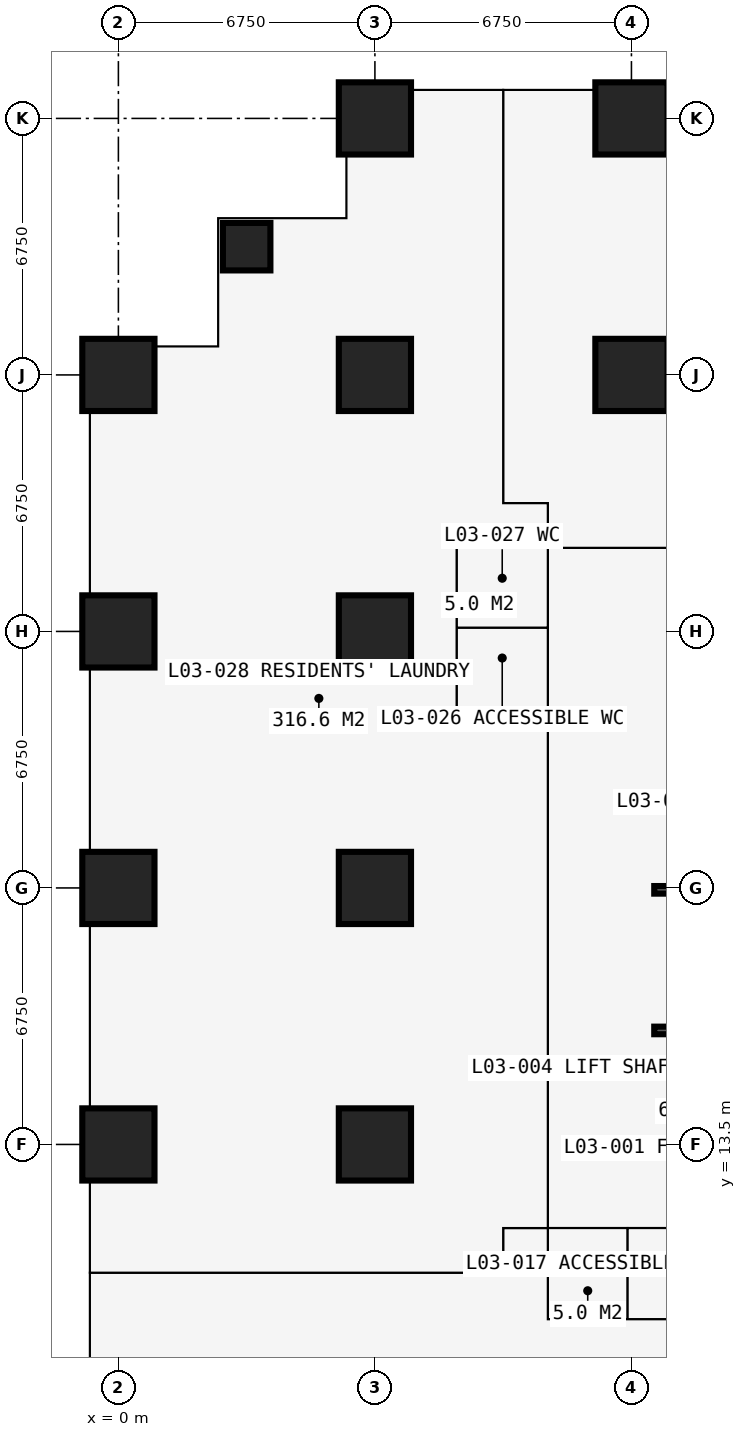
"""IFC4 building model, lengths in metres.
Left out: names, types, materials, properties, quantities, classifications, styles, units other than length and angle.
Written with IfcOpenShell. Run it as: python <this file> out.ifc"""

import sys

from ifc_helpers import new_model, si_unit, direction, frame, frame_2d, origin, origin_2d, place, context, subcontext, project, spatial, rectangle, extrude, element, fill, save


model = new_model("IFC4")
c1 = context("Model", 3, precision=1e-05, world=origin(), true_north=direction((0.0, 1.0)))
c2 = subcontext(c1, "Body", "Model", "MODEL_VIEW")
j1 = project(units=[si_unit("LENGTHUNIT", "METRE"), si_unit("PLANEANGLEUNIT", "RADIAN")], contexts=[c1])
p1 = place(None, origin())
s1 = spatial("IfcSite", under=j1, at=p1, CompositionType="ELEMENT")
p2 = place(p1, origin())
s2 = spatial("IfcBuilding", under=s1, at=p2, CompositionType="ELEMENT")
p3 = place(p2, frame((0.0, 0.0, 13.5)))
s3 = spatial("IfcBuildingStorey", under=s2, at=p3, CompositionType="ELEMENT", Elevation=13.5)
for number, where, z_axis, x_axis in (
    (1, (0.0, 13.5, 0.0), (0.0, 0.0, 1.0), (1.0, 0.0, 0.0)),
    (2, (0.0, 20.25, 0.0), (0.0, 0.0, 1.0), (1.0, 0.0, 0.0)),
    (3, (0.0, 27.0, 0.0), (0.0, 0.0, 1.0), (1.0, 0.0, 0.0)),
    (4, (0.0, 33.75, 0.0), (0.0, 0.0, 1.0), (1.0, 0.0, 0.0)),
):
    element("IfcColumn", number, at=place(p3, frame(where, z_axis=z_axis, x_axis=x_axis)), inside=s3, PredefinedType="COLUMN", context=c2, shape_type="SweptSolid", body=[
        extrude(rectangle(XDim=1.9, YDim=1.9, at=origin_2d()), origin(), (0.0, 0.0, 1.0), 4.5),
    ])
p4 = place(p3, frame((3.375, 37.125, 0.0), z_axis=(0.0, 0.0, 1.0), x_axis=(1.0, 0.0, 0.0)))
e5 = element("IfcColumn", 5, at=p4, inside=s3, PredefinedType="COLUMN", context=c2, shape_type="SweptSolid", body=[
    extrude(rectangle(XDim=1.25, YDim=1.25, at=origin_2d()), origin(), (0.0, 0.0, 1.0), 4.5),
])
for number, where, z_axis, x_axis in (
    (6, (6.75, 13.5, 0.0), (0.0, 0.0, 1.0), (1.0, 0.0, 0.0)),
    (7, (6.75, 20.25, 0.0), (0.0, 0.0, 1.0), (1.0, 0.0, 0.0)),
    (8, (6.75, 27.0, 0.0), (0.0, 0.0, 1.0), (1.0, 0.0, 0.0)),
    (9, (6.75, 33.75, 0.0), (0.0, 0.0, 1.0), (1.0, 0.0, 0.0)),
    (10, (6.75, 40.5, 0.0), (0.0, 0.0, 1.0), (1.0, 0.0, 0.0)),
    (11, (13.5, 33.75, 0.0), (0.0, 0.0, 1.0), (1.0, 0.0, 0.0)),
    (12, (13.5, 40.5, 0.0), (0.0, 0.0, 1.0), (1.0, 0.0, 0.0)),
):
    element("IfcColumn", number, at=place(p3, frame(where, z_axis=z_axis, x_axis=x_axis)), inside=s3, PredefinedType="COLUMN", context=c2, shape_type="SweptSolid", body=[
        extrude(rectangle(XDim=1.9, YDim=1.9, at=origin_2d()), origin(), (0.0, 0.0, 1.0), 4.5),
    ])
p5 = place(p3, frame((12.9, 13.5, 0.0), z_axis=(0.0, 0.0, 1.0), x_axis=(1.0, 0.0, 0.0)))
e13 = element("IfcWall", 13, at=p5, inside=s3, PredefinedType="SHEAR", context=c2, shape_type="SweptSolid", body=[
    extrude(rectangle(XDim=14.7, YDim=1.2, at=frame_2d((7.35, 0.0))), origin(), (0.0, 0.0, 1.0), 4.5),
])
p6 = place(p3, frame((27.6, 27.0, 0.0), z_axis=(0.0, 0.0, 1.0), x_axis=(-1.0, 0.0, 0.0)))
e14 = element("IfcWall", 14, at=p6, inside=s3, PredefinedType="SHEAR", context=c2, shape_type="SweptSolid", body=[
    extrude(rectangle(XDim=14.7, YDim=1.2, at=frame_2d((7.35, 0.0))), origin(), (0.0, 0.0, 1.0), 4.5),
])
p7 = place(p6, frame((4.55, 0.0, 0.0)))
e15 = element("IfcOpeningElement", 15, at=p7, cuts=e14, PredefinedType="OPENING", context=c2, shape_type="SweptSolid", body=[
    extrude(rectangle(XDim=0.9, YDim=2.2, at=frame_2d((0.45, 1.1))), frame((0.0, 0.61, 0.0), z_axis=(0.0, -1.0, 0.0), x_axis=(1.0, 0.0, 0.0)), (0.0, 0.0, 1.0), 1.22),
])
p8 = place(p6, frame((7.525, 0.0, 0.0)))
e16 = element("IfcOpeningElement", 16, at=p8, cuts=e14, PredefinedType="OPENING", context=c2, shape_type="SweptSolid", body=[
    extrude(rectangle(XDim=1.0, YDim=2.2, at=frame_2d((0.5, 1.1))), frame((0.0, 0.61, 0.0), z_axis=(0.0, -1.0, 0.0), x_axis=(1.0, 0.0, 0.0)), (0.0, 0.0, 1.0), 1.22),
])
p9 = place(p3, frame((13.5, 26.4, 0.0), z_axis=(0.0, 0.0, 1.0), x_axis=(0.0, -1.0, 0.0)))
e17 = element("IfcWall", 17, at=p9, inside=s3, PredefinedType="SHEAR", context=c2, shape_type="SweptSolid", body=[
    extrude(rectangle(XDim=12.3, YDim=1.2, at=frame_2d((6.15, 0.0))), origin(), (0.0, 0.0, 1.0), 4.5),
])
p10 = place(p9, frame((7.45, 0.0, 0.0)))
e18 = element("IfcOpeningElement", 18, at=p10, cuts=e17, PredefinedType="OPENING", context=c2, shape_type="SweptSolid", body=[
    extrude(rectangle(XDim=1.2, YDim=2.2, at=frame_2d((0.6, 1.1))), frame((0.0, 0.61, 0.0), z_axis=(0.0, -1.0, 0.0), x_axis=(1.0, 0.0, 0.0)), (0.0, 0.0, 1.0), 1.22),
])
p11 = place(p3, frame((6.0, 41.25, 0.0), z_axis=(0.0, 0.0, 1.0), x_axis=(0.0, -1.0, 0.0)))
e19 = element("IfcWall", 19, at=p11, inside=s3, PredefinedType="SOLIDWALL", context=c2, shape_type="SweptSolid", body=[
    extrude(rectangle(XDim=3.375, YDim=0.3, at=frame_2d((1.688, 0.0))), origin(), (0.0, 0.0, 1.0), 4.275),
])
p12 = place(p11, frame((1.857, 0.0, 0.9)))
e20 = element("IfcOpeningElement", 20, at=p12, cuts=e19, PredefinedType="OPENING", context=c2, shape_type="SweptSolid", body=[
    extrude(rectangle(XDim=1.2, YDim=1.8, at=frame_2d((0.6, 0.9))), frame((0.0, 0.16, 0.0), z_axis=(0.0, -1.0, 0.0), x_axis=(1.0, 0.0, 0.0)), (0.0, 0.0, 1.0), 0.32),
])
p13 = place(p3, frame((6.0, 37.875, 0.0), z_axis=(0.0, 0.0, 1.0), x_axis=(-1.0, 0.0, 0.0)))
e21 = element("IfcWall", 21, at=p13, inside=s3, PredefinedType="SOLIDWALL", context=c2, shape_type="SweptSolid", body=[
    extrude(rectangle(XDim=3.375, YDim=0.3, at=frame_2d((1.688, 0.0))), origin(), (0.0, 0.0, 1.0), 4.275),
])
p14 = place(p13, frame((0.938, 0.0, 0.9)))
e22 = element("IfcOpeningElement", 22, at=p14, cuts=e21, PredefinedType="OPENING", context=c2, shape_type="SweptSolid", body=[
    extrude(rectangle(XDim=1.5, YDim=1.8, at=frame_2d((0.75, 0.9))), frame((0.0, 0.16, 0.0), z_axis=(0.0, -1.0, 0.0), x_axis=(1.0, 0.0, 0.0)), (0.0, 0.0, 1.0), 0.32),
])
p15 = place(p3, frame((2.625, 37.875, 0.0), z_axis=(0.0, 0.0, 1.0), x_axis=(0.0, -1.0, 0.0)))
e23 = element("IfcWall", 23, at=p15, inside=s3, PredefinedType="SOLIDWALL", context=c2, shape_type="SweptSolid", body=[
    extrude(rectangle(XDim=3.375, YDim=0.3, at=frame_2d((1.688, 0.0))), origin(), (0.0, 0.0, 1.0), 4.275),
])
p16 = place(p15, frame((0.938, 0.0, 0.9)))
e24 = element("IfcOpeningElement", 24, at=p16, cuts=e23, PredefinedType="OPENING", context=c2, shape_type="SweptSolid", body=[
    extrude(rectangle(XDim=1.5, YDim=1.8, at=frame_2d((0.75, 0.9))), frame((0.0, 0.16, 0.0), z_axis=(0.0, -1.0, 0.0), x_axis=(1.0, 0.0, 0.0)), (0.0, 0.0, 1.0), 0.32),
])
p17 = place(p3, frame((2.625, 34.5, 0.0), z_axis=(0.0, 0.0, 1.0), x_axis=(-1.0, 0.0, 0.0)))
e25 = element("IfcWall", 25, at=p17, inside=s3, PredefinedType="SOLIDWALL", context=c2, shape_type="SweptSolid", body=[
    extrude(rectangle(XDim=3.375, YDim=0.3, at=frame_2d((1.688, 0.0))), origin(), (0.0, 0.0, 1.0), 4.275),
])
p18 = place(p17, frame((0.317, 0.0, 0.9)))
e26 = element("IfcOpeningElement", 26, at=p18, cuts=e25, PredefinedType="OPENING", context=c2, shape_type="SweptSolid", body=[
    extrude(rectangle(XDim=1.2, YDim=1.8, at=frame_2d((0.6, 0.9))), frame((0.0, 0.16, 0.0), z_axis=(0.0, -1.0, 0.0), x_axis=(1.0, 0.0, 0.0)), (0.0, 0.0, 1.0), 0.32),
])
p19 = place(p3, frame((-0.75, 20.25, 0.0), z_axis=(0.0, 0.0, 1.0), x_axis=(0.0, 1.0, 0.0)))
e27 = element("IfcWall", 27, at=p19, inside=s3, PredefinedType="SOLIDWALL", context=c2, shape_type="SweptSolid", body=[
    extrude(rectangle(XDim=6.75, YDim=0.15, at=frame_2d((3.375, 0.0))), origin(), (0.0, 0.0, 1.0), 4.275),
])
p20 = place(p19, frame((0.962, 0.0, 0.0)))
e28 = element("IfcOpeningElement", 28, at=p20, cuts=e27, PredefinedType="OPENING", context=c2, shape_type="SweptSolid", body=[
    extrude(rectangle(XDim=2.4, YDim=2.4, at=frame_2d((1.2, 1.2))), frame((0.0, 0.085, 0.0), z_axis=(0.0, -1.0, 0.0), x_axis=(1.0, 0.0, 0.0)), (0.0, 0.0, 1.0), 0.17),
])
p21 = place(p19, frame((3.387, 0.0, 0.0)))
e29 = element("IfcOpeningElement", 29, at=p21, cuts=e27, PredefinedType="OPENING", context=c2, shape_type="SweptSolid", body=[
    extrude(rectangle(XDim=2.4, YDim=2.4, at=frame_2d((1.2, 1.2))), frame((0.0, 0.085, 0.0), z_axis=(0.0, -1.0, 0.0), x_axis=(1.0, 0.0, 0.0)), (0.0, 0.0, 1.0), 0.17),
])
p22 = place(p3, frame((14.1, 16.5, 0.0), z_axis=(0.0, 0.0, 1.0), x_axis=(1.0, 0.0, 0.0)))
e30 = element("IfcWall", 30, at=p22, inside=s3, PredefinedType="SHEAR", context=c2, shape_type="SweptSolid", body=[
    extrude(rectangle(XDim=12.3, YDim=0.2, at=frame_2d((6.15, 0.0))), origin(), (0.0, 0.0, 1.0), 4.5),
])
p23 = place(p22, frame((0.9, 0.0, 0.0)))
e31 = element("IfcOpeningElement", 31, at=p23, cuts=e30, PredefinedType="OPENING", context=c2, shape_type="SweptSolid", body=[
    extrude(rectangle(XDim=1.1, YDim=2.2, at=frame_2d((0.55, 1.1))), frame((0.0, 0.11, 0.0), z_axis=(0.0, -1.0, 0.0), x_axis=(1.0, 0.0, 0.0)), (0.0, 0.0, 1.0), 0.22),
])
p24 = place(p22, frame((9.5, 0.0, 0.0)))
e32 = element("IfcOpeningElement", 32, at=p24, cuts=e30, PredefinedType="OPENING", context=c2, shape_type="SweptSolid", body=[
    extrude(rectangle(XDim=1.1, YDim=2.2, at=frame_2d((0.55, 1.1))), frame((0.0, 0.11, 0.0), z_axis=(0.0, -1.0, 0.0), x_axis=(1.0, 0.0, 0.0)), (0.0, 0.0, 1.0), 0.22),
])
p25 = place(p3, frame((14.1, 20.2, 0.0), z_axis=(0.0, 0.0, 1.0), x_axis=(1.0, 0.0, 0.0)))
e33 = element("IfcWall", 33, at=p25, inside=s3, PredefinedType="SHEAR", context=c2, shape_type="SweptSolid", body=[
    extrude(rectangle(XDim=12.3, YDim=0.2, at=frame_2d((6.15, 0.0))), origin(), (0.0, 0.0, 1.0), 4.5),
])
p26 = place(p25, frame((0.35, 0.0, 0.0)))
e34 = element("IfcOpeningElement", 34, at=p26, cuts=e33, PredefinedType="OPENING", context=c2, shape_type="SweptSolid", body=[
    extrude(rectangle(XDim=1.1, YDim=2.2, at=frame_2d((0.55, 1.1))), frame((0.0, 0.11, 0.0), z_axis=(0.0, -1.0, 0.0), x_axis=(1.0, 0.0, 0.0)), (0.0, 0.0, 1.0), 0.22),
])
p27 = place(p25, frame((9.75, 0.0, 0.0)))
e35 = element("IfcOpeningElement", 35, at=p27, cuts=e33, PredefinedType="OPENING", context=c2, shape_type="SweptSolid", body=[
    extrude(rectangle(XDim=1.1, YDim=2.2, at=frame_2d((0.55, 1.1))), frame((0.0, 0.11, 0.0), z_axis=(0.0, -1.0, 0.0), x_axis=(1.0, 0.0, 0.0)), (0.0, 0.0, 1.0), 0.22),
])
p28 = place(p3, frame((-0.734, 10.125, 0.0), z_axis=(0.0, 0.0, 1.0), x_axis=(1.0, 0.0, 0.0)))
e36 = element("IfcWall", 36, at=p28, inside=s3, PredefinedType="PARTITIONING", context=c2, shape_type="SweptSolid", body=[
    extrude(rectangle(XDim=10.859, YDim=0.15, at=frame_2d((5.429, 0.0))), origin(), (0.0, 0.0, 1.0), 4.275),
])
p29 = place(p3, frame((8.9, 25.0, 0.0), z_axis=(0.0, 0.0, 1.0), x_axis=(0.0, 1.0, 0.0)))
e37 = element("IfcWall", 37, at=p29, inside=s3, PredefinedType="PARTITIONING", context=c2, shape_type="SweptSolid", body=[
    extrude(rectangle(XDim=4.2, YDim=0.15, at=frame_2d((2.1, 0.0))), origin(), (0.0, 0.0, 1.0), 4.275),
])
p30 = place(p3, frame((8.9, 25.0, 0.0), z_axis=(0.0, 0.0, 1.0), x_axis=(1.0, 0.0, 0.0)))
e38 = element("IfcWall", 38, at=p30, inside=s3, PredefinedType="PARTITIONING", context=c2, shape_type="SweptSolid", body=[
    extrude(rectangle(XDim=2.4, YDim=0.1, at=frame_2d((1.2, 0.0))), origin(), (0.0, 0.0, 1.0), 4.275),
])
p31 = place(p3, frame((8.9, 27.1, 0.0), z_axis=(0.0, 0.0, 1.0), x_axis=(1.0, 0.0, 0.0)))
e39 = element("IfcWall", 39, at=p31, inside=s3, PredefinedType="PARTITIONING", context=c2, shape_type="SweptSolid", body=[
    extrude(rectangle(XDim=2.4, YDim=0.1, at=frame_2d((1.2, 0.0))), origin(), (0.0, 0.0, 1.0), 3.777),
])
p32 = place(p3, frame((8.9, 29.2, 0.0), z_axis=(0.0, 0.0, 1.0), x_axis=(1.0, 0.0, 0.0)))
e40 = element("IfcWall", 40, at=p32, inside=s3, PredefinedType="PARTITIONING", context=c2, shape_type="SweptSolid", body=[
    extrude(rectangle(XDim=21.475, YDim=0.15, at=frame_2d((10.738, 0.0))), origin(), (0.0, 0.0, 1.0), 4.275),
])
p33 = place(p32, frame((16.65, 0.0, 0.0)))
e41 = element("IfcOpeningElement", 41, at=p33, cuts=e40, PredefinedType="OPENING", context=c2, shape_type="SweptSolid", body=[
    extrude(rectangle(XDim=1.0, YDim=2.2, at=frame_2d((0.5, 1.1))), frame((0.0, 0.085, 0.0), z_axis=(0.0, -1.0, 0.0), x_axis=(1.0, 0.0, 0.0)), (0.0, 0.0, 1.0), 0.17),
])
p34 = place(p32, frame((18.75, 0.0, 0.0)))
e42 = element("IfcOpeningElement", 42, at=p34, cuts=e40, PredefinedType="OPENING", context=c2, shape_type="SweptSolid", body=[
    extrude(rectangle(XDim=1.0, YDim=2.2, at=frame_2d((0.5, 1.1))), frame((0.0, 0.085, 0.0), z_axis=(0.0, -1.0, 0.0), x_axis=(1.0, 0.0, 0.0)), (0.0, 0.0, 1.0), 0.17),
])
p35 = place(p32, frame((8.45, 0.0, 0.0)))
e43 = element("IfcOpeningElement", 43, at=p35, cuts=e40, PredefinedType="OPENING", context=c2, shape_type="SweptSolid", body=[
    extrude(rectangle(XDim=1.6, YDim=2.4, at=frame_2d((0.8, 1.2))), frame((0.0, 0.085, 0.0), z_axis=(0.0, -1.0, 0.0), x_axis=(1.0, 0.0, 0.0)), (0.0, 0.0, 1.0), 0.17),
])
p36 = place(p3, frame((10.125, 10.125, 0.0), z_axis=(0.0, 0.0, 1.0), x_axis=(0.0, 1.0, 0.0)))
e44 = element("IfcWall", 44, at=p36, inside=s3, PredefinedType="PARTITIONING", context=c2, shape_type="SweptSolid", body=[
    extrude(rectangle(XDim=1.175, YDim=0.15, at=frame_2d((0.587, 0.0))), origin(), (0.0, 0.0, 1.0), 4.275),
])
p37 = place(p3, frame((10.125, 11.3, 0.0), z_axis=(0.0, 0.0, 1.0), x_axis=(1.0, 0.0, 0.0)))
e45 = element("IfcWall", 45, at=p37, inside=s3, PredefinedType="PARTITIONING", context=c2, shape_type="SweptSolid", body=[
    extrude(rectangle(XDim=20.675, YDim=0.15, at=frame_2d((10.337, 0.0))), origin(), (0.0, 0.0, 1.0), 4.275),
])
p38 = place(p37, frame((1.725, 0.0, 0.0)))
e46 = element("IfcOpeningElement", 46, at=p38, cuts=e45, PredefinedType="OPENING", context=c2, shape_type="SweptSolid", body=[
    extrude(rectangle(XDim=1.0, YDim=2.2, at=frame_2d((0.5, 1.1))), frame((0.0, 0.085, 0.0), z_axis=(0.0, -1.0, 0.0), x_axis=(1.0, 0.0, 0.0)), (0.0, 0.0, 1.0), 0.17),
])
p39 = place(p37, frame((3.825, 0.0, 0.0)))
e47 = element("IfcOpeningElement", 47, at=p39, cuts=e45, PredefinedType="OPENING", context=c2, shape_type="SweptSolid", body=[
    extrude(rectangle(XDim=1.0, YDim=2.2, at=frame_2d((0.5, 1.1))), frame((0.0, 0.085, 0.0), z_axis=(0.0, -1.0, 0.0), x_axis=(1.0, 0.0, 0.0)), (0.0, 0.0, 1.0), 0.17),
])
p40 = place(p37, frame((10.625, 0.0, 0.0)))
e48 = element("IfcOpeningElement", 48, at=p40, cuts=e45, PredefinedType="OPENING", context=c2, shape_type="SweptSolid", body=[
    extrude(rectangle(XDim=1.6, YDim=2.4, at=frame_2d((0.8, 1.2))), frame((0.0, 0.085, 0.0), z_axis=(0.0, -1.0, 0.0), x_axis=(1.0, 0.0, 0.0)), (0.0, 0.0, 1.0), 0.17),
])
p41 = place(p3, frame((10.125, 30.375, 0.0), z_axis=(0.0, 0.0, 1.0), x_axis=(0.0, 1.0, 0.0)))
e49 = element("IfcWall", 49, at=p41, inside=s3, PredefinedType="PARTITIONING", context=c2, shape_type="SweptSolid", body=[
    extrude(rectangle(XDim=10.859, YDim=0.15, at=frame_2d((5.429, 0.0))), origin(), (0.0, 0.0, 1.0), 4.275),
])
p42 = place(p3, frame((10.125, 30.375, 0.0), z_axis=(0.0, 0.0, 1.0), x_axis=(1.0, 0.0, 0.0)))
e50 = element("IfcWall", 50, at=p42, inside=s3, PredefinedType="PARTITIONING", context=c2, shape_type="SweptSolid", body=[
    extrude(rectangle(XDim=1.175, YDim=0.15, at=frame_2d((0.587, 0.0))), origin(), (0.0, 0.0, 1.0), 4.275),
])
p43 = place(p3, frame((11.3, 8.9, 0.0), z_axis=(0.0, 0.0, 1.0), x_axis=(0.0, 1.0, 0.0)))
e51 = element("IfcWall", 51, at=p43, inside=s3, PredefinedType="PARTITIONING", context=c2, shape_type="SweptSolid", body=[
    extrude(rectangle(XDim=21.475, YDim=0.15, at=frame_2d((10.738, 0.0))), origin(), (0.0, 0.0, 1.0), 4.275),
])
p44 = place(p43, frame((16.65, 0.0, 0.0)))
e52 = element("IfcOpeningElement", 52, at=p44, cuts=e51, PredefinedType="OPENING", context=c2, shape_type="SweptSolid", body=[
    extrude(rectangle(XDim=1.0, YDim=2.2, at=frame_2d((0.5, 1.1))), frame((0.0, 0.085, 0.0), z_axis=(0.0, -1.0, 0.0), x_axis=(1.0, 0.0, 0.0)), (0.0, 0.0, 1.0), 0.17),
])
p45 = place(p43, frame((18.75, 0.0, 0.0)))
e53 = element("IfcOpeningElement", 53, at=p45, cuts=e51, PredefinedType="OPENING", context=c2, shape_type="SweptSolid", body=[
    extrude(rectangle(XDim=1.0, YDim=2.2, at=frame_2d((0.5, 1.1))), frame((0.0, 0.085, 0.0), z_axis=(0.0, -1.0, 0.0), x_axis=(1.0, 0.0, 0.0)), (0.0, 0.0, 1.0), 0.17),
])
p46 = place(p43, frame((8.45, 0.0, 0.0)))
e54 = element("IfcOpeningElement", 54, at=p46, cuts=e51, PredefinedType="OPENING", context=c2, shape_type="SweptSolid", body=[
    extrude(rectangle(XDim=1.6, YDim=2.4, at=frame_2d((0.8, 1.2))), frame((0.0, 0.085, 0.0), z_axis=(0.0, -1.0, 0.0), x_axis=(1.0, 0.0, 0.0)), (0.0, 0.0, 1.0), 0.17),
])
p47 = place(p3, frame((11.3, 8.9, 0.0), z_axis=(0.0, 0.0, 1.0), x_axis=(1.0, 0.0, 0.0)))
e55 = element("IfcWall", 55, at=p47, inside=s3, PredefinedType="PARTITIONING", context=c2, shape_type="SweptSolid", body=[
    extrude(rectangle(XDim=4.2, YDim=0.15, at=frame_2d((2.1, 0.0))), origin(), (0.0, 0.0, 1.0), 4.275),
])
p48 = place(p3, frame((13.4, 8.9, 0.0), z_axis=(0.0, 0.0, 1.0), x_axis=(0.0, 1.0, 0.0)))
e56 = element("IfcWall", 56, at=p48, inside=s3, PredefinedType="PARTITIONING", context=c2, shape_type="SweptSolid", body=[
    extrude(rectangle(XDim=2.4, YDim=0.1, at=frame_2d((1.2, 0.0))), origin(), (0.0, 0.0, 1.0), 3.777),
])
p49 = place(p12, origin())
e57 = element("IfcWindow", 57, at=p49, inside=s3, PartitioningType="SINGLE_PANEL", PredefinedType="WINDOW", context=c2, shape_type="SweptSolid", body=[
    extrude(rectangle(XDim=1.2, YDim=1.8, at=frame_2d((0.6, 0.9))), frame((0.0, 0.03, 0.0), z_axis=(0.0, -1.0, 0.0), x_axis=(1.0, 0.0, 0.0)), (0.0, 0.0, 1.0), 0.06),
])
fill(e20, e57)
p50 = place(p14, origin())
e58 = element("IfcWindow", 58, at=p50, inside=s3, PartitioningType="SINGLE_PANEL", PredefinedType="WINDOW", context=c2, shape_type="SweptSolid", body=[
    extrude(rectangle(XDim=1.5, YDim=1.8, at=frame_2d((0.75, 0.9))), frame((0.0, 0.03, 0.0), z_axis=(0.0, -1.0, 0.0), x_axis=(1.0, 0.0, 0.0)), (0.0, 0.0, 1.0), 0.06),
])
fill(e22, e58)
p51 = place(p16, origin())
e59 = element("IfcWindow", 59, at=p51, inside=s3, PartitioningType="SINGLE_PANEL", PredefinedType="WINDOW", context=c2, shape_type="SweptSolid", body=[
    extrude(rectangle(XDim=1.5, YDim=1.8, at=frame_2d((0.75, 0.9))), frame((0.0, 0.03, 0.0), z_axis=(0.0, -1.0, 0.0), x_axis=(1.0, 0.0, 0.0)), (0.0, 0.0, 1.0), 0.06),
])
fill(e24, e59)
p52 = place(p18, origin())
e60 = element("IfcWindow", 60, at=p52, inside=s3, PartitioningType="SINGLE_PANEL", PredefinedType="WINDOW", context=c2, shape_type="SweptSolid", body=[
    extrude(rectangle(XDim=1.2, YDim=1.8, at=frame_2d((0.6, 0.9))), frame((0.0, 0.03, 0.0), z_axis=(0.0, -1.0, 0.0), x_axis=(1.0, 0.0, 0.0)), (0.0, 0.0, 1.0), 0.06),
])
fill(e26, e60)
p53 = place(p20, origin())
e61 = element("IfcDoor", 61, at=p53, inside=s3, OperationType="SLIDING_TO_LEFT", PredefinedType="DOOR", context=c2, shape_type="SweptSolid", body=[
    extrude(rectangle(XDim=2.4, YDim=2.4, at=frame_2d((1.2, 1.2))), frame((0.0, 0.025, 0.0), z_axis=(0.0, -1.0, 0.0), x_axis=(1.0, 0.0, 0.0)), (0.0, 0.0, 1.0), 0.05),
])
fill(e28, e61)
p54 = place(p21, origin())
e62 = element("IfcDoor", 62, at=p54, inside=s3, OperationType="SLIDING_TO_LEFT", PredefinedType="DOOR", context=c2, shape_type="SweptSolid", body=[
    extrude(rectangle(XDim=2.4, YDim=2.4, at=frame_2d((1.2, 1.2))), frame((0.0, 0.025, 0.0), z_axis=(0.0, -1.0, 0.0), x_axis=(1.0, 0.0, 0.0)), (0.0, 0.0, 1.0), 0.05),
])
fill(e29, e62)
p55 = place(p10, origin())
e63 = element("IfcDoor", 63, at=p55, inside=s3, OperationType="DOUBLE_DOOR_SINGLE_SWING", PredefinedType="DOOR", context=c2, shape_type="SweptSolid", body=[
    extrude(rectangle(XDim=1.2, YDim=2.2, at=frame_2d((0.6, 1.1))), frame((0.0, 0.025, 0.0), z_axis=(0.0, -1.0, 0.0), x_axis=(1.0, 0.0, 0.0)), (0.0, 0.0, 1.0), 0.05),
])
fill(e18, e63)
p56 = place(p38, origin())
e64 = element("IfcDoor", 64, at=p56, inside=s3, OperationType="SINGLE_SWING_LEFT", PredefinedType="DOOR", context=c2, shape_type="SweptSolid", body=[
    extrude(rectangle(XDim=1.0, YDim=2.2, at=frame_2d((0.5, 1.1))), frame((0.0, 0.025, 0.0), z_axis=(0.0, -1.0, 0.0), x_axis=(1.0, 0.0, 0.0)), (0.0, 0.0, 1.0), 0.05),
])
fill(e46, e64)
p57 = place(p39, origin())
e65 = element("IfcDoor", 65, at=p57, inside=s3, OperationType="SINGLE_SWING_LEFT", PredefinedType="DOOR", context=c2, shape_type="SweptSolid", body=[
    extrude(rectangle(XDim=1.0, YDim=2.2, at=frame_2d((0.5, 1.1))), frame((0.0, 0.025, 0.0), z_axis=(0.0, -1.0, 0.0), x_axis=(1.0, 0.0, 0.0)), (0.0, 0.0, 1.0), 0.05),
])
fill(e47, e65)
p58 = place(p44, origin())
e66 = element("IfcDoor", 66, at=p58, inside=s3, OperationType="SINGLE_SWING_LEFT", PredefinedType="DOOR", context=c2, shape_type="SweptSolid", body=[
    extrude(rectangle(XDim=1.0, YDim=2.2, at=frame_2d((0.5, 1.1))), frame((0.0, 0.025, 0.0), z_axis=(0.0, -1.0, 0.0), x_axis=(1.0, 0.0, 0.0)), (0.0, 0.0, 1.0), 0.05),
])
fill(e52, e66)
p59 = place(p45, origin())
e67 = element("IfcDoor", 67, at=p59, inside=s3, OperationType="SINGLE_SWING_LEFT", PredefinedType="DOOR", context=c2, shape_type="SweptSolid", body=[
    extrude(rectangle(XDim=1.0, YDim=2.2, at=frame_2d((0.5, 1.1))), frame((0.0, 0.025, 0.0), z_axis=(0.0, -1.0, 0.0), x_axis=(1.0, 0.0, 0.0)), (0.0, 0.0, 1.0), 0.05),
])
fill(e53, e67)
p60 = place(p46, origin())
e68 = element("IfcDoor", 68, at=p60, inside=s3, OperationType="DOUBLE_DOOR_SINGLE_SWING", PredefinedType="DOOR", context=c2, shape_type="SweptSolid", body=[
    extrude(rectangle(XDim=1.6, YDim=2.4, at=frame_2d((0.8, 1.2))), frame((0.0, 0.025, 0.0), z_axis=(0.0, -1.0, 0.0), x_axis=(1.0, 0.0, 0.0)), (0.0, 0.0, 1.0), 0.05),
])
fill(e54, e68)
save(model, sys.argv[1])
